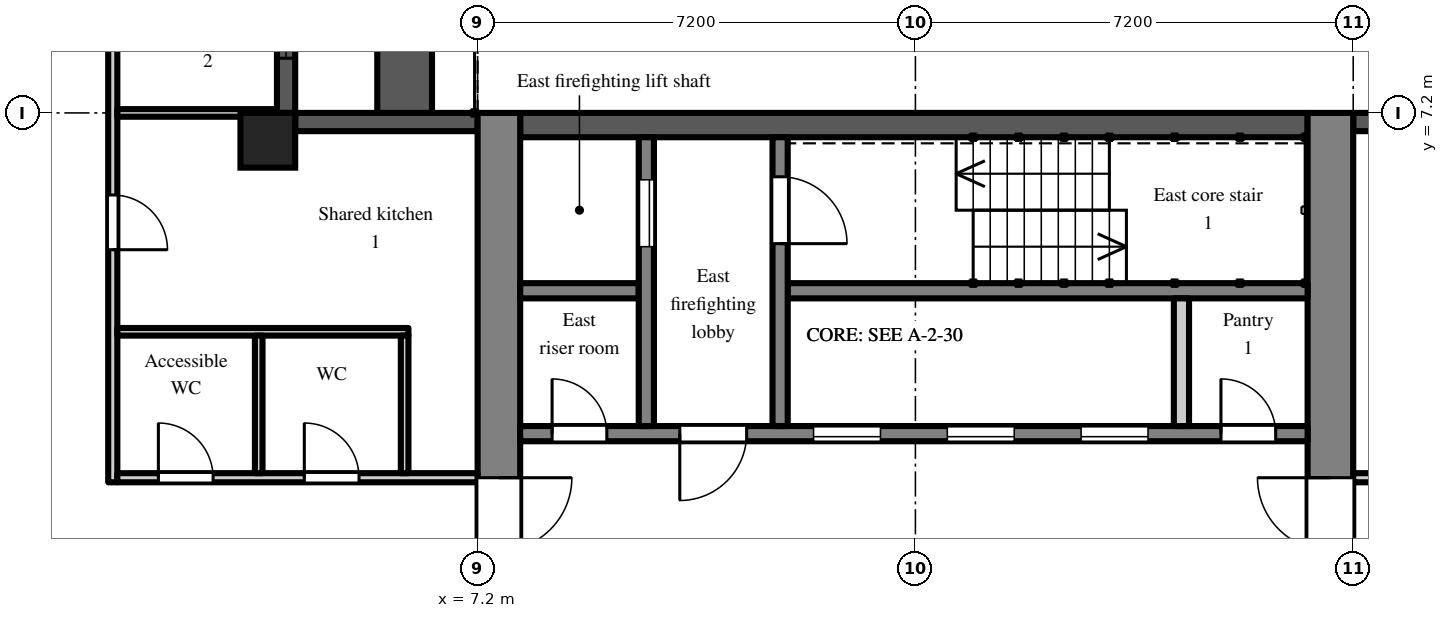
"""IFC4 building model, lengths in metres.
Left out: names, types, materials, properties, quantities, classifications, styles, units other than length and angle.
Written with IfcOpenShell. Run it as: python <this file> out.ifc"""

import sys

from ifc_helpers import new_model, si_unit, direction, frame, frame_2d, origin, origin_2d, place, context, subcontext, project, spatial, rectangle, extrude, element, fill, save


model = new_model("IFC4")
c1 = context("Model", 3, precision=1e-05, world=origin(), true_north=direction((0.0, 1.0)))
c2 = subcontext(c1, "Body", "Model", "MODEL_VIEW")
j1 = project(units=[si_unit("LENGTHUNIT", "METRE"), si_unit("PLANEANGLEUNIT", "RADIAN")], contexts=[c1])
p1 = place(None, origin())
s1 = spatial("IfcSite", under=j1, at=p1, CompositionType="ELEMENT")
p2 = place(p1, origin())
s2 = spatial("IfcBuilding", under=s1, at=p2, CompositionType="ELEMENT")
p3 = place(p2, frame((0.0, 0.0, 179.7)))
s3 = spatial("IfcBuildingStorey", under=s2, at=p3, CompositionType="ELEMENT", Elevation=179.7)
p4 = place(p3, frame((3.75, 6.75, 0.0), z_axis=(0.0, 0.0, 1.0), x_axis=(1.0, 0.0, 0.0)))
e1 = element("IfcColumn", 1, at=p4, inside=s3, PredefinedType="COLUMN", context=c2, shape_type="SweptSolid", body=[
    extrude(rectangle(XDim=0.9, YDim=0.9, at=origin_2d()), origin(), (0.0, 0.0, 1.0), 3.0),
])
p5 = place(p3, frame((24.3, 7.05, 0.0), z_axis=(0.0, 0.0, 1.0), x_axis=(-1.0, 0.0, 0.0)))
e2 = element("IfcWall", 2, at=p5, inside=s3, PredefinedType="SOLIDWALL", context=c2, shape_type="SweptSolid", body=[
    extrude(rectangle(XDim=2.7, YDim=0.3, at=frame_2d((1.35, 0.0))), origin(), (0.0, 0.0, 1.0), 2.2),
])
p6 = place(p5, frame((0.75, 0.0, 0.2)))
e3 = element("IfcOpeningElement", 3, at=p6, cuts=e2, PredefinedType="OPENING", context=c2, shape_type="SweptSolid", body=[
    extrude(rectangle(XDim=1.2, YDim=1.85, at=frame_2d((0.6, 0.925))), frame((0.0, 0.16, 0.0), z_axis=(0.0, -1.0, 0.0), x_axis=(1.0, 0.0, 0.0)), (0.0, 0.0, 1.0), 0.32),
])
p7 = place(p3, frame((7.2, 7.05, 0.0), z_axis=(0.0, 0.0, 1.0), x_axis=(-1.0, 0.0, 0.0)))
e4 = element("IfcWall", 4, at=p7, inside=s3, PredefinedType="SOLIDWALL", context=c2, shape_type="SweptSolid", body=[
    extrude(rectangle(XDim=3.0, YDim=0.3, at=frame_2d((1.5, 0.0))), origin(), (0.0, 0.0, 1.0), 2.2),
])
p8 = place(p3, frame((4.05, 7.2, 0.0), z_axis=(0.0, 0.0, 1.0), x_axis=(0.0, 1.0, 0.0)))
e5 = element("IfcWall", 5, at=p8, inside=s3, PredefinedType="SOLIDWALL", context=c2, shape_type="SweptSolid", body=[
    extrude(rectangle(XDim=7.2, YDim=0.3, at=frame_2d((3.6, 0.0))), origin(), (0.0, 0.0, 1.0), 2.2),
])
p9 = place(p8, frame((3.0, 0.0, 0.0)))
e6 = element("IfcOpeningElement", 6, at=p9, cuts=e5, PredefinedType="OPENING", context=c2, shape_type="SweptSolid", body=[
    extrude(rectangle(XDim=1.2, YDim=2.05, at=frame_2d((0.6, 1.025))), frame((0.0, 0.16, 0.0), z_axis=(0.0, -1.0, 0.0), x_axis=(1.0, 0.0, 0.0)), (0.0, 0.0, 1.0), 0.32),
])
p10 = place(p8, frame((0.9, 0.0, 0.2)))
e7 = element("IfcOpeningElement", 7, at=p10, cuts=e5, PredefinedType="OPENING", context=c2, shape_type="SweptSolid", body=[
    extrude(rectangle(XDim=1.8, YDim=1.85, at=frame_2d((0.9, 0.925))), frame((0.0, 0.16, 0.0), z_axis=(0.0, -1.0, 0.0), x_axis=(1.0, 0.0, 0.0)), (0.0, 0.0, 1.0), 0.32),
])
p11 = place(p8, frame((4.5, 0.0, 0.2)))
e8 = element("IfcOpeningElement", 8, at=p11, cuts=e5, PredefinedType="OPENING", context=c2, shape_type="SweptSolid", body=[
    extrude(rectangle(XDim=1.8, YDim=1.85, at=frame_2d((0.9, 0.925))), frame((0.0, 0.16, 0.0), z_axis=(0.0, -1.0, 0.0), x_axis=(1.0, 0.0, 0.0)), (0.0, 0.0, 1.0), 0.32),
])
p12 = place(p3, frame((6.0, 7.2, 0.0), z_axis=(0.0, 0.0, 1.0), x_axis=(0.0, 1.0, 0.0)))
e9 = element("IfcWall", 9, at=p12, inside=s3, PredefinedType="PARAPET", context=c2, shape_type="SweptSolid", body=[
    extrude(rectangle(XDim=7.2, YDim=0.9, at=frame_2d((3.6, 0.0))), origin(), (0.0, 0.0, 1.0), 0.8),
])
p13 = place(p3, frame((7.55, -7.2, 0.0), z_axis=(0.0, 0.0, 1.0), x_axis=(0.0, 1.0, 0.0)))
e10 = element("IfcWall", 10, at=p13, inside=s3, PredefinedType="SHEAR", context=c2, shape_type="SweptSolid", body=[
    extrude(rectangle(XDim=14.4, YDim=0.7, at=frame_2d((7.2, 0.0))), origin(), (0.0, 0.0, 1.0), 2.6),
])
p14 = place(p13, frame((6.0, 0.0, 0.0)))
e11 = element("IfcOpeningElement", 11, at=p14, cuts=e10, PredefinedType="OPENING", context=c2, shape_type="SweptSolid", body=[
    extrude(rectangle(XDim=2.4, YDim=2.2, at=frame_2d((1.2, 1.1))), frame((0.0, 0.36, 0.0), z_axis=(0.0, -1.0, 0.0), x_axis=(1.0, 0.0, 0.0)), (0.0, 0.0, 1.0), 0.72),
])
p15 = place(p3, frame((21.225, -7.2, 0.0), z_axis=(0.0, 0.0, 1.0), x_axis=(0.0, 1.0, 0.0)))
e12 = element("IfcWall", 12, at=p15, inside=s3, PredefinedType="SHEAR", context=c2, shape_type="SweptSolid", body=[
    extrude(rectangle(XDim=14.4, YDim=0.75, at=frame_2d((7.2, 0.0))), origin(), (0.0, 0.0, 1.0), 2.6),
])
p16 = place(p15, frame((6.0, 0.0, 0.0)))
e13 = element("IfcOpeningElement", 13, at=p16, cuts=e12, PredefinedType="OPENING", context=c2, shape_type="SweptSolid", body=[
    extrude(rectangle(XDim=2.4, YDim=2.2, at=frame_2d((1.2, 1.1))), frame((0.0, 0.385, 0.0), z_axis=(0.0, -1.0, 0.0), x_axis=(1.0, 0.0, 0.0)), (0.0, 0.0, 1.0), 0.77),
])
p17 = place(p3, frame((7.9, 7.0, 0.0), z_axis=(0.0, 0.0, 1.0), x_axis=(1.0, 0.0, 0.0)))
e14 = element("IfcWall", 14, at=p17, inside=s3, PredefinedType="SHEAR", context=c2, shape_type="SweptSolid", body=[
    extrude(rectangle(XDim=12.95, YDim=0.4, at=frame_2d((6.475, 0.0))), origin(), (0.0, 0.0, 1.0), 2.6),
])
p18 = place(p3, frame((7.9, 1.925, 0.0), z_axis=(0.0, 0.0, 1.0), x_axis=(1.0, 0.0, 0.0)))
e15 = element("IfcWall", 15, at=p18, inside=s3, PredefinedType="SHEAR", context=c2, shape_type="SweptSolid", body=[
    extrude(rectangle(XDim=12.95, YDim=0.25, at=frame_2d((6.475, 0.0))), origin(), (0.0, 0.0, 1.0), 2.6),
])
p19 = place(p18, frame((4.825, 0.0, 0.0)))
e16 = element("IfcOpeningElement", 16, at=p19, cuts=e15, PredefinedType="OPENING", context=c2, shape_type="SweptSolid", body=[
    extrude(rectangle(XDim=1.1, YDim=2.1, at=frame_2d((0.55, 1.05))), frame((0.0, 0.135, 0.0), z_axis=(0.0, -1.0, 0.0), x_axis=(1.0, 0.0, 0.0)), (0.0, 0.0, 1.0), 0.27),
])
p20 = place(p18, frame((7.025, 0.0, 0.0)))
e17 = element("IfcOpeningElement", 17, at=p20, cuts=e15, PredefinedType="OPENING", context=c2, shape_type="SweptSolid", body=[
    extrude(rectangle(XDim=1.1, YDim=2.1, at=frame_2d((0.55, 1.05))), frame((0.0, 0.135, 0.0), z_axis=(0.0, -1.0, 0.0), x_axis=(1.0, 0.0, 0.0)), (0.0, 0.0, 1.0), 0.27),
])
p21 = place(p18, frame((9.225, 0.0, 0.0)))
e18 = element("IfcOpeningElement", 18, at=p21, cuts=e15, PredefinedType="OPENING", context=c2, shape_type="SweptSolid", body=[
    extrude(rectangle(XDim=1.1, YDim=2.1, at=frame_2d((0.55, 1.05))), frame((0.0, 0.135, 0.0), z_axis=(0.0, -1.0, 0.0), x_axis=(1.0, 0.0, 0.0)), (0.0, 0.0, 1.0), 0.27),
])
p22 = place(p18, frame((0.525, 0.0, 0.0)))
e19 = element("IfcOpeningElement", 19, at=p22, cuts=e15, PredefinedType="OPENING", context=c2, shape_type="SweptSolid", body=[
    extrude(rectangle(XDim=0.9, YDim=2.1, at=frame_2d((0.45, 1.05))), frame((0.0, 0.135, 0.0), z_axis=(0.0, -1.0, 0.0), x_axis=(1.0, 0.0, 0.0)), (0.0, 0.0, 1.0), 0.27),
])
p23 = place(p18, frame((2.625, 0.0, 0.0)))
e20 = element("IfcOpeningElement", 20, at=p23, cuts=e15, PredefinedType="OPENING", context=c2, shape_type="SweptSolid", body=[
    extrude(rectangle(XDim=1.1, YDim=2.1, at=frame_2d((0.55, 1.05))), frame((0.0, 0.135, 0.0), z_axis=(0.0, -1.0, 0.0), x_axis=(1.0, 0.0, 0.0)), (0.0, 0.0, 1.0), 0.27),
])
p24 = place(p18, frame((11.525, 0.0, 0.0)))
e21 = element("IfcOpeningElement", 21, at=p24, cuts=e15, PredefinedType="OPENING", context=c2, shape_type="SweptSolid", body=[
    extrude(rectangle(XDim=0.9, YDim=2.1, at=frame_2d((0.45, 1.05))), frame((0.0, 0.135, 0.0), z_axis=(0.0, -1.0, 0.0), x_axis=(1.0, 0.0, 0.0)), (0.0, 0.0, 1.0), 0.27),
])
p25 = place(p3, frame((7.9, 4.275, 0.0), z_axis=(0.0, 0.0, 1.0), x_axis=(1.0, 0.0, 0.0)))
e22 = element("IfcWall", 22, at=p25, inside=s3, PredefinedType="SHEAR", context=c2, shape_type="SweptSolid", body=[
    extrude(rectangle(XDim=1.95, YDim=0.25, at=frame_2d((0.975, 0.0))), origin(), (0.0, 0.0, 1.0), 2.6),
])
p26 = place(p3, frame((12.3, 4.275, 0.0), z_axis=(0.0, 0.0, 1.0), x_axis=(1.0, 0.0, 0.0)))
e23 = element("IfcWall", 23, at=p26, inside=s3, PredefinedType="SHEAR", context=c2, shape_type="SweptSolid", body=[
    extrude(rectangle(XDim=8.55, YDim=0.25, at=frame_2d((4.275, 0.0))), origin(), (0.0, 0.0, 1.0), 2.6),
])
p27 = place(p3, frame((9.975, 2.05, 0.0), z_axis=(0.0, 0.0, 1.0), x_axis=(0.0, 1.0, 0.0)))
e24 = element("IfcWall", 24, at=p27, inside=s3, PredefinedType="SHEAR", context=c2, shape_type="SweptSolid", body=[
    extrude(rectangle(XDim=4.75, YDim=0.25, at=frame_2d((2.375, 0.0))), origin(), (0.0, 0.0, 1.0), 2.6),
])
p28 = place(p27, frame((2.95, 0.0, 0.0)))
e25 = element("IfcOpeningElement", 25, at=p28, cuts=e24, PredefinedType="OPENING", context=c2, shape_type="SweptSolid", body=[
    extrude(rectangle(XDim=1.1, YDim=2.1, at=frame_2d((0.55, 1.05))), frame((0.0, 0.135, 0.0), z_axis=(0.0, -1.0, 0.0), x_axis=(1.0, 0.0, 0.0)), (0.0, 0.0, 1.0), 0.27),
])
p29 = place(p3, frame((12.175, 2.05, 0.0), z_axis=(0.0, 0.0, 1.0), x_axis=(0.0, 1.0, 0.0)))
e26 = element("IfcWall", 26, at=p29, inside=s3, PredefinedType="SHEAR", context=c2, shape_type="SweptSolid", body=[
    extrude(rectangle(XDim=4.75, YDim=0.25, at=frame_2d((2.375, 0.0))), origin(), (0.0, 0.0, 1.0), 2.6),
])
p30 = place(p29, frame((3.0, 0.0, 0.0)))
e27 = element("IfcOpeningElement", 27, at=p30, cuts=e26, PredefinedType="OPENING", context=c2, shape_type="SweptSolid", body=[
    extrude(rectangle(XDim=1.1, YDim=2.1, at=frame_2d((0.55, 1.05))), frame((0.0, 0.135, 0.0), z_axis=(0.0, -1.0, 0.0), x_axis=(1.0, 0.0, 0.0)), (0.0, 0.0, 1.0), 0.27),
])
p31 = place(p3, frame((18.775, 2.05, 0.0), z_axis=(0.0, 0.0, 1.0), x_axis=(0.0, 1.0, 0.0)))
e28 = element("IfcWall", 28, at=p31, inside=s3, PredefinedType="PARTITIONING", context=c2, shape_type="SweptSolid", body=[
    extrude(rectangle(XDim=2.1, YDim=0.25, at=frame_2d((1.05, 0.0))), origin(), (0.0, 0.0, 1.0), 2.6),
])
p32 = place(p3, frame((1.2, 1.125, 0.0), z_axis=(0.0, 0.0, 1.0), x_axis=(0.0, 1.0, 0.0)))
e29 = element("IfcWall", 29, at=p32, inside=s3, PredefinedType="PARTITIONING", context=c2, shape_type="SweptSolid", body=[
    extrude(rectangle(XDim=18.4, YDim=0.15, at=frame_2d((9.2, 0.0))), origin(), (0.0, 0.0, 1.0), 2.6),
])
p33 = place(p32, frame((3.825, 0.0, 0.0)))
e30 = element("IfcOpeningElement", 30, at=p33, cuts=e29, PredefinedType="OPENING", context=c2, shape_type="SweptSolid", body=[
    extrude(rectangle(XDim=0.9, YDim=2.1, at=frame_2d((0.45, 1.05))), frame((0.0, 0.085, 0.0), z_axis=(0.0, -1.0, 0.0), x_axis=(1.0, 0.0, 0.0)), (0.0, 0.0, 1.0), 0.17),
])
p34 = place(p32, frame((11.425, 0.0, 0.0)))
e31 = element("IfcOpeningElement", 31, at=p34, cuts=e29, PredefinedType="OPENING", context=c2, shape_type="SweptSolid", body=[
    extrude(rectangle(XDim=0.9, YDim=2.1, at=frame_2d((0.45, 1.05))), frame((0.0, 0.085, 0.0), z_axis=(0.0, -1.0, 0.0), x_axis=(1.0, 0.0, 0.0)), (0.0, 0.0, 1.0), 0.17),
])
p35 = place(p32, frame((7.825, 0.0, 0.0)))
e32 = element("IfcOpeningElement", 32, at=p35, cuts=e29, PredefinedType="OPENING", context=c2, shape_type="SweptSolid", body=[
    extrude(rectangle(XDim=0.9, YDim=2.1, at=frame_2d((0.45, 1.05))), frame((0.0, 0.085, 0.0), z_axis=(0.0, -1.0, 0.0), x_axis=(1.0, 0.0, 0.0)), (0.0, 0.0, 1.0), 0.17),
])
p36 = place(p32, frame((13.475, 0.0, 0.0)))
e33 = element("IfcOpeningElement", 33, at=p36, cuts=e29, PredefinedType="OPENING", context=c2, shape_type="SweptSolid", body=[
    extrude(rectangle(XDim=1.0, YDim=2.1, at=frame_2d((0.5, 1.05))), frame((0.0, 0.085, 0.0), z_axis=(0.0, -1.0, 0.0), x_axis=(1.0, 0.0, 0.0)), (0.0, 0.0, 1.0), 0.17),
])
p37 = place(p32, frame((17.225, 0.0, 0.0)))
e34 = element("IfcOpeningElement", 34, at=p37, cuts=e29, PredefinedType="OPENING", context=c2, shape_type="SweptSolid", body=[
    extrude(rectangle(XDim=0.9, YDim=2.1, at=frame_2d((0.45, 1.05))), frame((0.0, 0.085, 0.0), z_axis=(0.0, -1.0, 0.0), x_axis=(1.0, 0.0, 0.0)), (0.0, 0.0, 1.0), 0.17),
])
p38 = place(p3, frame((1.275, 1.2, 0.0), z_axis=(0.0, 0.0, 1.0), x_axis=(1.0, 0.0, 0.0)))
e35 = element("IfcWall", 35, at=p38, inside=s3, PredefinedType="PARTITIONING", context=c2, shape_type="SweptSolid", body=[
    extrude(rectangle(XDim=5.925, YDim=0.15, at=frame_2d((2.962, 0.0))), origin(), (0.0, 0.0, 1.0), 2.6),
])
p39 = place(p38, frame((0.675, 0.0, 0.0)))
e36 = element("IfcOpeningElement", 36, at=p39, cuts=e35, PredefinedType="OPENING", context=c2, shape_type="SweptSolid", body=[
    extrude(rectangle(XDim=0.9, YDim=2.1, at=frame_2d((0.45, 1.05))), frame((0.0, 0.085, 0.0), z_axis=(0.0, -1.0, 0.0), x_axis=(1.0, 0.0, 0.0)), (0.0, 0.0, 1.0), 0.17),
])
p40 = place(p38, frame((3.075, 0.0, 0.0)))
e37 = element("IfcOpeningElement", 37, at=p40, cuts=e35, PredefinedType="OPENING", context=c2, shape_type="SweptSolid", body=[
    extrude(rectangle(XDim=0.9, YDim=2.1, at=frame_2d((0.45, 1.05))), frame((0.0, 0.085, 0.0), z_axis=(0.0, -1.0, 0.0), x_axis=(1.0, 0.0, 0.0)), (0.0, 0.0, 1.0), 0.17),
])
p41 = place(p3, frame((1.275, 3.6, 0.0), z_axis=(0.0, 0.0, 1.0), x_axis=(1.0, 0.0, 0.0)))
e38 = element("IfcWall", 38, at=p41, inside=s3, PredefinedType="PARTITIONING", context=c2, shape_type="SweptSolid", body=[
    extrude(rectangle(XDim=4.788, YDim=0.125, at=frame_2d((2.394, 0.0))), origin(), (0.0, 0.0, 1.0), 2.6),
])
p42 = place(p3, frame((1.275, 7.2, 0.0), z_axis=(0.0, 0.0, 1.0), x_axis=(1.0, 0.0, 0.0)))
e39 = element("IfcWall", 39, at=p42, inside=s3, PredefinedType="PARTITIONING", context=c2, shape_type="SweptSolid", body=[
    extrude(rectangle(XDim=2.625, YDim=0.125, at=frame_2d((1.312, 0.0))), origin(), (0.0, 0.0, 1.0), 2.6),
])
for number, where, z_axis, x_axis in (
    (40, (3.6, 1.275, 0.0), (0.0, 0.0, 1.0), (0.0, 1.0, 0.0)),
    (41, (6.0, 1.275, 0.0), (0.0, 0.0, 1.0), (0.0, 1.0, 0.0)),
):
    element("IfcWall", number, at=place(p3, frame(where, z_axis=z_axis, x_axis=x_axis)), inside=s3, PredefinedType="PARTITIONING", context=c2, shape_type="SweptSolid", body=[
        extrude(rectangle(XDim=2.263, YDim=0.125, at=frame_2d((1.131, 0.0))), origin(), (0.0, 0.0, 1.0), 2.6),
    ])
p43 = place(p3, frame((21.6, 1.2, 0.0), z_axis=(0.0, 0.0, 1.0), x_axis=(1.0, 0.0, 0.0)))
e42 = element("IfcWall", 42, at=p43, inside=s3, PredefinedType="PARTITIONING", context=c2, shape_type="SweptSolid", body=[
    extrude(rectangle(XDim=5.125, YDim=0.15, at=frame_2d((2.562, 0.0))), origin(), (0.0, 0.0, 1.0), 2.6),
])
p44 = place(p43, frame((0.6, 0.0, 0.0)))
e43 = element("IfcOpeningElement", 43, at=p44, cuts=e42, PredefinedType="OPENING", context=c2, shape_type="SweptSolid", body=[
    extrude(rectangle(XDim=1.0, YDim=2.1, at=frame_2d((0.5, 1.05))), frame((0.0, 0.085, 0.0), z_axis=(0.0, -1.0, 0.0), x_axis=(1.0, 0.0, 0.0)), (0.0, 0.0, 1.0), 0.17),
])
p45 = place(p43, frame((3.95, 0.0, 0.0)))
e44 = element("IfcOpeningElement", 44, at=p45, cuts=e42, PredefinedType="OPENING", context=c2, shape_type="SweptSolid", body=[
    extrude(rectangle(XDim=0.9, YDim=2.1, at=frame_2d((0.45, 1.05))), frame((0.0, 0.085, 0.0), z_axis=(0.0, -1.0, 0.0), x_axis=(1.0, 0.0, 0.0)), (0.0, 0.0, 1.0), 0.17),
])
p46 = place(p10, origin())
e45 = element("IfcWindow", 45, at=p46, inside=s3, PartitioningType="SINGLE_PANEL", PredefinedType="WINDOW", context=c2, shape_type="SweptSolid", body=[
    extrude(rectangle(XDim=1.8, YDim=1.85, at=frame_2d((0.9, 0.925))), frame((0.0, 0.03, 0.0), z_axis=(0.0, -1.0, 0.0), x_axis=(1.0, 0.0, 0.0)), (0.0, 0.0, 1.0), 0.06),
])
fill(e7, e45)
p47 = place(p19, origin())
e46 = element("IfcDoor", 46, at=p47, inside=s3, OperationType="SLIDING_TO_LEFT", PredefinedType="DOOR", context=c2, shape_type="SweptSolid", body=[
    extrude(rectangle(XDim=1.1, YDim=2.1, at=frame_2d((0.55, 1.05))), frame((0.0, 0.025, 0.0), z_axis=(0.0, -1.0, 0.0), x_axis=(1.0, 0.0, 0.0)), (0.0, 0.0, 1.0), 0.05),
])
fill(e16, e46)
p48 = place(p20, origin())
e47 = element("IfcDoor", 47, at=p48, inside=s3, OperationType="SLIDING_TO_LEFT", PredefinedType="DOOR", context=c2, shape_type="SweptSolid", body=[
    extrude(rectangle(XDim=1.1, YDim=2.1, at=frame_2d((0.55, 1.05))), frame((0.0, 0.025, 0.0), z_axis=(0.0, -1.0, 0.0), x_axis=(1.0, 0.0, 0.0)), (0.0, 0.0, 1.0), 0.05),
])
fill(e17, e47)
p49 = place(p21, origin())
e48 = element("IfcDoor", 48, at=p49, inside=s3, OperationType="SLIDING_TO_LEFT", PredefinedType="DOOR", context=c2, shape_type="SweptSolid", body=[
    extrude(rectangle(XDim=1.1, YDim=2.1, at=frame_2d((0.55, 1.05))), frame((0.0, 0.025, 0.0), z_axis=(0.0, -1.0, 0.0), x_axis=(1.0, 0.0, 0.0)), (0.0, 0.0, 1.0), 0.05),
])
fill(e18, e48)
p50 = place(p28, origin())
e49 = element("IfcDoor", 49, at=p50, inside=s3, OperationType="SLIDING_TO_LEFT", PredefinedType="DOOR", context=c2, shape_type="SweptSolid", body=[
    extrude(rectangle(XDim=1.1, YDim=2.1, at=frame_2d((0.55, 1.05))), frame((0.0, 0.025, 0.0), z_axis=(0.0, -1.0, 0.0), x_axis=(1.0, 0.0, 0.0)), (0.0, 0.0, 1.0), 0.05),
])
fill(e25, e49)
p51 = place(p30, frame((1.1, 0.0, 0.0), z_axis=(0.0, 0.0, 1.0), x_axis=(-1.0, 0.0, 0.0)))
e50 = element("IfcDoor", 50, at=p51, inside=s3, OperationType="SINGLE_SWING_RIGHT", PredefinedType="DOOR", context=c2, shape_type="SweptSolid", body=[
    extrude(rectangle(XDim=1.1, YDim=2.1, at=frame_2d((0.55, 1.05))), frame((0.0, 0.025, 0.0), z_axis=(0.0, -1.0, 0.0), x_axis=(1.0, 0.0, 0.0)), (0.0, 0.0, 1.0), 0.05),
])
fill(e27, e50)
p52 = place(p22, origin())
e51 = element("IfcDoor", 51, at=p52, inside=s3, OperationType="SINGLE_SWING_LEFT", PredefinedType="DOOR", context=c2, shape_type="SweptSolid", body=[
    extrude(rectangle(XDim=0.9, YDim=2.1, at=frame_2d((0.45, 1.05))), frame((0.0, 0.025, 0.0), z_axis=(0.0, -1.0, 0.0), x_axis=(1.0, 0.0, 0.0)), (0.0, 0.0, 1.0), 0.05),
])
fill(e19, e51)
p53 = place(p23, frame((1.1, 0.0, 0.0), z_axis=(0.0, 0.0, 1.0), x_axis=(-1.0, 0.0, 0.0)))
e52 = element("IfcDoor", 52, at=p53, inside=s3, OperationType="SINGLE_SWING_RIGHT", PredefinedType="DOOR", context=c2, shape_type="SweptSolid", body=[
    extrude(rectangle(XDim=1.1, YDim=2.1, at=frame_2d((0.55, 1.05))), frame((0.0, 0.025, 0.0), z_axis=(0.0, -1.0, 0.0), x_axis=(1.0, 0.0, 0.0)), (0.0, 0.0, 1.0), 0.05),
])
fill(e20, e52)
p54 = place(p14, frame((2.4, 0.0, 0.0), z_axis=(0.0, 0.0, 1.0), x_axis=(-1.0, 0.0, 0.0)))
e53 = element("IfcDoor", 53, at=p54, inside=s3, OperationType="DOUBLE_DOOR_DOUBLE_SWING", PredefinedType="DOOR", context=c2, shape_type="SweptSolid", body=[
    extrude(rectangle(XDim=2.4, YDim=2.2, at=frame_2d((1.2, 1.1))), frame((0.0, 0.025, 0.0), z_axis=(0.0, -1.0, 0.0), x_axis=(1.0, 0.0, 0.0)), (0.0, 0.0, 1.0), 0.05),
])
fill(e11, e53)
p55 = place(p16, origin())
e54 = element("IfcDoor", 54, at=p55, inside=s3, OperationType="DOUBLE_DOOR_DOUBLE_SWING", PredefinedType="DOOR", context=c2, shape_type="SweptSolid", body=[
    extrude(rectangle(XDim=2.4, YDim=2.2, at=frame_2d((1.2, 1.1))), frame((0.0, 0.025, 0.0), z_axis=(0.0, -1.0, 0.0), x_axis=(1.0, 0.0, 0.0)), (0.0, 0.0, 1.0), 0.05),
])
fill(e13, e54)
p56 = place(p24, origin())
e55 = element("IfcDoor", 55, at=p56, inside=s3, OperationType="SINGLE_SWING_LEFT", PredefinedType="DOOR", context=c2, shape_type="SweptSolid", body=[
    extrude(rectangle(XDim=0.9, YDim=2.1, at=frame_2d((0.45, 1.05))), frame((0.0, 0.025, 0.0), z_axis=(0.0, -1.0, 0.0), x_axis=(1.0, 0.0, 0.0)), (0.0, 0.0, 1.0), 0.05),
])
fill(e21, e55)
p57 = place(p39, origin())
e56 = element("IfcDoor", 56, at=p57, inside=s3, OperationType="SINGLE_SWING_LEFT", PredefinedType="DOOR", context=c2, shape_type="SweptSolid", body=[
    extrude(rectangle(XDim=0.9, YDim=2.1, at=frame_2d((0.45, 1.05))), frame((0.0, 0.025, 0.0), z_axis=(0.0, -1.0, 0.0), x_axis=(1.0, 0.0, 0.0)), (0.0, 0.0, 1.0), 0.05),
])
fill(e36, e56)
p58 = place(p40, origin())
e57 = element("IfcDoor", 57, at=p58, inside=s3, OperationType="SINGLE_SWING_LEFT", PredefinedType="DOOR", context=c2, shape_type="SweptSolid", body=[
    extrude(rectangle(XDim=0.9, YDim=2.1, at=frame_2d((0.45, 1.05))), frame((0.0, 0.025, 0.0), z_axis=(0.0, -1.0, 0.0), x_axis=(1.0, 0.0, 0.0)), (0.0, 0.0, 1.0), 0.05),
])
fill(e37, e57)
p59 = place(p33, frame((0.9, 0.0, 0.0), z_axis=(0.0, 0.0, 1.0), x_axis=(-1.0, 0.0, 0.0)))
e58 = element("IfcDoor", 58, at=p59, inside=s3, OperationType="SINGLE_SWING_RIGHT", PredefinedType="DOOR", context=c2, shape_type="SweptSolid", body=[
    extrude(rectangle(XDim=0.9, YDim=2.1, at=frame_2d((0.45, 1.05))), frame((0.0, 0.025, 0.0), z_axis=(0.0, -1.0, 0.0), x_axis=(1.0, 0.0, 0.0)), (0.0, 0.0, 1.0), 0.05),
])
fill(e30, e58)
save(model, sys.argv[1])
